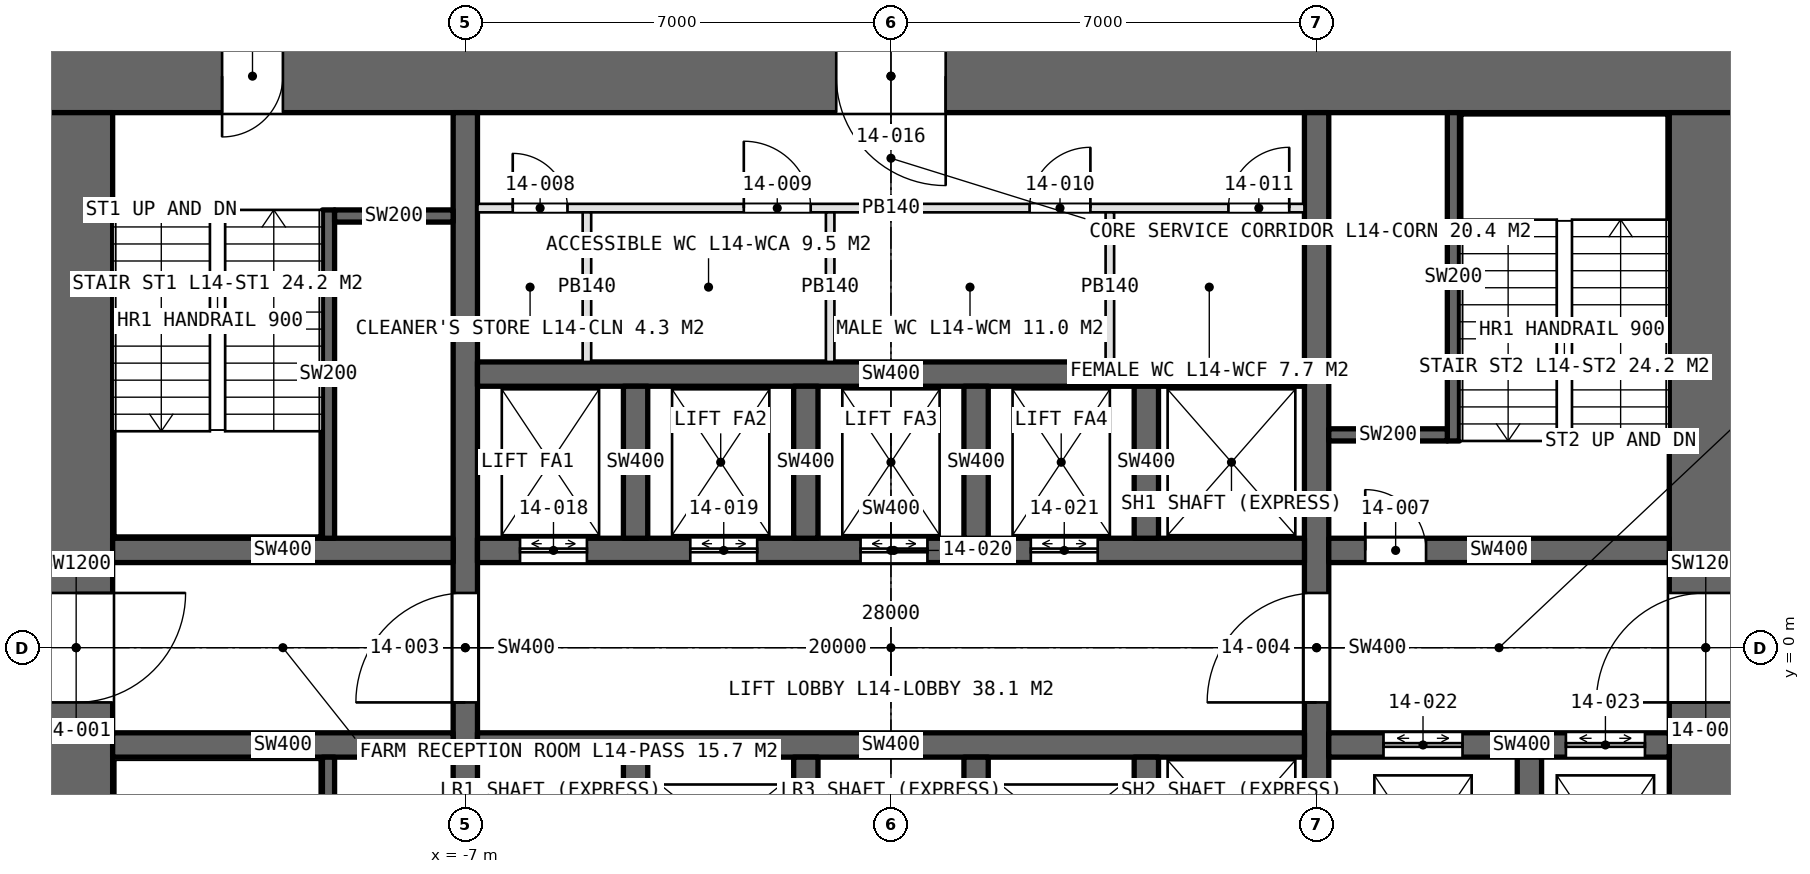
"""IFC4 building model, lengths in metres.
Left out: names, types, materials, properties, quantities, classifications, styles, units other than length and angle.
Written with IfcOpenShell. Run it as: python <this file> out.ifc"""

import sys

from ifc_helpers import new_model, si_unit, direction, frame, frame_2d, origin, place, context, subcontext, project, spatial, rectangle, extrude, element, fill, save


model = new_model("IFC4")
c1 = context("Model", 3, precision=1e-05, world=origin(), true_north=direction((0.0, 1.0)))
c2 = subcontext(c1, "Body", "Model", "MODEL_VIEW")
j1 = project(units=[si_unit("LENGTHUNIT", "METRE"), si_unit("PLANEANGLEUNIT", "RADIAN")], contexts=[c1])
p1 = place(None, origin())
s1 = spatial("IfcSite", under=j1, at=p1, CompositionType="ELEMENT")
p2 = place(p1, origin())
s2 = spatial("IfcBuilding", under=s1, at=p2, CompositionType="ELEMENT")
p3 = place(p2, frame((0.0, 0.0, 70.0)))
s3 = spatial("IfcBuildingStorey", under=s2, at=p3, CompositionType="ELEMENT", Elevation=70.0)
p4 = place(p3, frame((14.0, 9.4, 0.0), z_axis=(0.0, 0.0, 1.0), x_axis=(-1.0, 0.0, 0.0)))
e1 = element("IfcWall", 1, at=p4, inside=s3, PredefinedType="SHEAR", context=c2, shape_type="SweptSolid", body=[
    extrude(rectangle(XDim=28.0, YDim=1.2, at=frame_2d((14.0, 0.0))), origin(), (0.0, 0.0, 1.0), 5.0),
])
p5 = place(p4, frame((24.0, 0.0, 0.0)))
e2 = element("IfcOpeningElement", 2, at=p5, cuts=e1, PredefinedType="OPENING", context=c2, shape_type="SweptSolid", body=[
    extrude(rectangle(XDim=1.0, YDim=2.4, at=frame_2d((0.5, 1.2))), frame((0.0, 0.61, 0.0), z_axis=(0.0, -1.0, 0.0), x_axis=(1.0, 0.0, 0.0)), (0.0, 0.0, 1.0), 1.22),
])
p6 = place(p4, frame((13.1, 0.0, 0.0)))
e3 = element("IfcOpeningElement", 3, at=p6, cuts=e1, PredefinedType="OPENING", context=c2, shape_type="SweptSolid", body=[
    extrude(rectangle(XDim=1.8, YDim=2.4, at=frame_2d((0.9, 1.2))), frame((0.0, 0.61, 0.0), z_axis=(0.0, -1.0, 0.0), x_axis=(1.0, 0.0, 0.0)), (0.0, 0.0, 1.0), 1.22),
])
p7 = place(p3, frame((-13.4, 8.8, 0.0), z_axis=(0.0, 0.0, 1.0), x_axis=(0.0, -1.0, 0.0)))
e4 = element("IfcWall", 4, at=p7, inside=s3, PredefinedType="SHEAR", context=c2, shape_type="SweptSolid", body=[
    extrude(rectangle(XDim=17.6, YDim=1.2, at=frame_2d((8.8, 0.0))), origin(), (0.0, 0.0, 1.0), 5.0),
])
p8 = place(p7, frame((7.9, 0.0, 0.0)))
e5 = element("IfcOpeningElement", 5, at=p8, cuts=e4, PredefinedType="OPENING", context=c2, shape_type="SweptSolid", body=[
    extrude(rectangle(XDim=1.8, YDim=2.4, at=frame_2d((0.9, 1.2))), frame((0.0, 0.61, 0.0), z_axis=(0.0, -1.0, 0.0), x_axis=(1.0, 0.0, 0.0)), (0.0, 0.0, 1.0), 1.22),
])
p9 = place(p7, frame((16.5, 0.0, 0.0)))
e6 = element("IfcOpeningElement", 6, at=p9, cuts=e4, PredefinedType="OPENING", context=c2, shape_type="SweptSolid", body=[
    extrude(rectangle(XDim=1.0, YDim=2.4, at=frame_2d((0.5, 1.2))), frame((0.0, 0.61, 0.0), z_axis=(0.0, -1.0, 0.0), x_axis=(1.0, 0.0, 0.0)), (0.0, 0.0, 1.0), 1.22),
])
p10 = place(p3, frame((13.4, -8.8, 0.0), z_axis=(0.0, 0.0, 1.0), x_axis=(0.0, 1.0, 0.0)))
e7 = element("IfcWall", 7, at=p10, inside=s3, PredefinedType="SHEAR", context=c2, shape_type="SweptSolid", body=[
    extrude(rectangle(XDim=17.6, YDim=1.2, at=frame_2d((8.8, 0.0))), origin(), (0.0, 0.0, 1.0), 5.0),
])
p11 = place(p10, frame((7.9, 0.0, 0.0)))
e8 = element("IfcOpeningElement", 8, at=p11, cuts=e7, PredefinedType="OPENING", context=c2, shape_type="SweptSolid", body=[
    extrude(rectangle(XDim=1.8, YDim=2.4, at=frame_2d((0.9, 1.2))), frame((0.0, 0.61, 0.0), z_axis=(0.0, -1.0, 0.0), x_axis=(1.0, 0.0, 0.0)), (0.0, 0.0, 1.0), 1.22),
])
p12 = place(p3, frame((-7.0, -8.8, 0.0), z_axis=(0.0, 0.0, 1.0), x_axis=(0.0, 1.0, 0.0)))
e9 = element("IfcWall", 9, at=p12, inside=s3, PredefinedType="SHEAR", context=c2, shape_type="SweptSolid", body=[
    extrude(rectangle(XDim=17.6, YDim=0.4, at=frame_2d((8.8, 0.0))), origin(), (0.0, 0.0, 1.0), 5.0),
])
p13 = place(p12, frame((7.9, 0.0, 0.0)))
e10 = element("IfcOpeningElement", 10, at=p13, cuts=e9, PredefinedType="OPENING", context=c2, shape_type="SweptSolid", body=[
    extrude(rectangle(XDim=1.8, YDim=2.4, at=frame_2d((0.9, 1.2))), frame((0.0, 0.21, 0.0), z_axis=(0.0, -1.0, 0.0), x_axis=(1.0, 0.0, 0.0)), (0.0, 0.0, 1.0), 0.42),
])
p14 = place(p3, frame((7.0, -8.8, 0.0), z_axis=(0.0, 0.0, 1.0), x_axis=(0.0, 1.0, 0.0)))
e11 = element("IfcWall", 11, at=p14, inside=s3, PredefinedType="SHEAR", context=c2, shape_type="SweptSolid", body=[
    extrude(rectangle(XDim=17.6, YDim=0.4, at=frame_2d((8.8, 0.0))), origin(), (0.0, 0.0, 1.0), 5.0),
])
p15 = place(p14, frame((7.9, 0.0, 0.0)))
e12 = element("IfcOpeningElement", 12, at=p15, cuts=e11, PredefinedType="OPENING", context=c2, shape_type="SweptSolid", body=[
    extrude(rectangle(XDim=1.8, YDim=2.4, at=frame_2d((0.9, 1.2))), frame((0.0, 0.21, 0.0), z_axis=(0.0, -1.0, 0.0), x_axis=(1.0, 0.0, 0.0)), (0.0, 0.0, 1.0), 0.42),
])
p16 = place(p3, frame((-6.8, 1.6, 0.0), z_axis=(0.0, 0.0, 1.0), x_axis=(1.0, 0.0, 0.0)))
e13 = element("IfcWall", 13, at=p16, inside=s3, PredefinedType="SHEAR", context=c2, shape_type="SweptSolid", body=[
    extrude(rectangle(XDim=13.6, YDim=0.4, at=frame_2d((6.8, 0.0))), origin(), (0.0, 0.0, 1.0), 5.0),
])
p17 = place(p16, frame((0.7, 0.0, 0.0)))
e14 = element("IfcOpeningElement", 14, at=p17, cuts=e13, PredefinedType="OPENING", context=c2, shape_type="SweptSolid", body=[
    extrude(rectangle(XDim=1.1, YDim=2.4, at=frame_2d((0.55, 1.2))), frame((0.0, 0.21, 0.0), z_axis=(0.0, -1.0, 0.0), x_axis=(1.0, 0.0, 0.0)), (0.0, 0.0, 1.0), 0.42),
])
p18 = place(p16, frame((3.5, 0.0, 0.0)))
e15 = element("IfcOpeningElement", 15, at=p18, cuts=e13, PredefinedType="OPENING", context=c2, shape_type="SweptSolid", body=[
    extrude(rectangle(XDim=1.1, YDim=2.4, at=frame_2d((0.55, 1.2))), frame((0.0, 0.21, 0.0), z_axis=(0.0, -1.0, 0.0), x_axis=(1.0, 0.0, 0.0)), (0.0, 0.0, 1.0), 0.42),
])
p19 = place(p16, frame((6.3, 0.0, 0.0)))
e16 = element("IfcOpeningElement", 16, at=p19, cuts=e13, PredefinedType="OPENING", context=c2, shape_type="SweptSolid", body=[
    extrude(rectangle(XDim=1.1, YDim=2.4, at=frame_2d((0.55, 1.2))), frame((0.0, 0.21, 0.0), z_axis=(0.0, -1.0, 0.0), x_axis=(1.0, 0.0, 0.0)), (0.0, 0.0, 1.0), 0.42),
])
p20 = place(p16, frame((9.1, 0.0, 0.0)))
e17 = element("IfcOpeningElement", 17, at=p20, cuts=e13, PredefinedType="OPENING", context=c2, shape_type="SweptSolid", body=[
    extrude(rectangle(XDim=1.1, YDim=2.4, at=frame_2d((0.55, 1.2))), frame((0.0, 0.21, 0.0), z_axis=(0.0, -1.0, 0.0), x_axis=(1.0, 0.0, 0.0)), (0.0, 0.0, 1.0), 0.42),
])
for number, where, z_axis, x_axis in (
    (18, (-6.8, -1.6, 0.0), (0.0, 0.0, 1.0), (1.0, 0.0, 0.0)),
    (19, (-6.8, 4.5, 0.0), (0.0, 0.0, 1.0), (1.0, 0.0, 0.0)),
):
    element("IfcWall", number, at=place(p3, frame(where, z_axis=z_axis, x_axis=x_axis)), inside=s3, PredefinedType="SHEAR", context=c2, shape_type="SweptSolid", body=[
        extrude(rectangle(XDim=13.6, YDim=0.4, at=frame_2d((6.8, 0.0))), origin(), (0.0, 0.0, 1.0), 5.0),
    ])
for number, where, z_axis, x_axis in (
    (20, (-12.8, 1.6, 0.0), (0.0, 0.0, 1.0), (1.0, 0.0, 0.0)),
    (21, (-12.8, -1.6, 0.0), (0.0, 0.0, 1.0), (1.0, 0.0, 0.0)),
):
    element("IfcWall", number, at=place(p3, frame(where, z_axis=z_axis, x_axis=x_axis)), inside=s3, PredefinedType="SHEAR", context=c2, shape_type="SweptSolid", body=[
        extrude(rectangle(XDim=5.6, YDim=0.4, at=frame_2d((2.8, 0.0))), origin(), (0.0, 0.0, 1.0), 5.0),
    ])
p21 = place(p3, frame((7.2, 1.6, 0.0), z_axis=(0.0, 0.0, 1.0), x_axis=(1.0, 0.0, 0.0)))
e22 = element("IfcWall", 22, at=p21, inside=s3, PredefinedType="SHEAR", context=c2, shape_type="SweptSolid", body=[
    extrude(rectangle(XDim=5.6, YDim=0.4, at=frame_2d((2.8, 0.0))), origin(), (0.0, 0.0, 1.0), 5.0),
])
p22 = place(p21, frame((0.6, 0.0, 0.0)))
e23 = element("IfcOpeningElement", 23, at=p22, cuts=e22, PredefinedType="OPENING", context=c2, shape_type="SweptSolid", body=[
    extrude(rectangle(XDim=1.0, YDim=2.4, at=frame_2d((0.5, 1.2))), frame((0.0, 0.21, 0.0), z_axis=(0.0, -1.0, 0.0), x_axis=(1.0, 0.0, 0.0)), (0.0, 0.0, 1.0), 0.42),
])
p23 = place(p3, frame((7.2, -1.6, 0.0), z_axis=(0.0, 0.0, 1.0), x_axis=(1.0, 0.0, 0.0)))
e24 = element("IfcWall", 24, at=p23, inside=s3, PredefinedType="SHEAR", context=c2, shape_type="SweptSolid", body=[
    extrude(rectangle(XDim=5.6, YDim=0.4, at=frame_2d((2.8, 0.0))), origin(), (0.0, 0.0, 1.0), 5.0),
])
p24 = place(p23, frame((0.9, 0.0, 0.0)))
e25 = element("IfcOpeningElement", 25, at=p24, cuts=e24, PredefinedType="OPENING", context=c2, shape_type="SweptSolid", body=[
    extrude(rectangle(XDim=1.3, YDim=2.4, at=frame_2d((0.65, 1.2))), frame((0.0, 0.21, 0.0), z_axis=(0.0, -1.0, 0.0), x_axis=(1.0, 0.0, 0.0)), (0.0, 0.0, 1.0), 0.42),
])
p25 = place(p23, frame((3.9, 0.0, 0.0)))
e26 = element("IfcOpeningElement", 26, at=p25, cuts=e24, PredefinedType="OPENING", context=c2, shape_type="SweptSolid", body=[
    extrude(rectangle(XDim=1.3, YDim=2.4, at=frame_2d((0.65, 1.2))), frame((0.0, 0.21, 0.0), z_axis=(0.0, -1.0, 0.0), x_axis=(1.0, 0.0, 0.0)), (0.0, 0.0, 1.0), 0.42),
])
p26 = place(p3, frame((10.5, -4.8, 0.0), z_axis=(0.0, 0.0, 1.0), x_axis=(0.0, 1.0, 0.0)))
e27 = element("IfcWall", 27, at=p26, inside=s3, PredefinedType="SHEAR", context=c2, shape_type="SweptSolid", body=[
    extrude(rectangle(XDim=3.0, YDim=0.4, at=frame_2d((1.5, 0.0))), origin(), (0.0, 0.0, 1.0), 5.0),
])
for number, where, z_axis, x_axis in (
    (28, (-4.2, 1.8, 0.0), (0.0, 0.0, 1.0), (0.0, 1.0, 0.0)),
    (29, (-4.2, -4.3, 0.0), (0.0, 0.0, 1.0), (0.0, 1.0, 0.0)),
    (30, (-1.4, 1.8, 0.0), (0.0, 0.0, 1.0), (0.0, 1.0, 0.0)),
    (31, (-1.4, -4.3, 0.0), (0.0, 0.0, 1.0), (0.0, 1.0, 0.0)),
    (32, (1.4, 1.8, 0.0), (0.0, 0.0, 1.0), (0.0, 1.0, 0.0)),
    (33, (1.4, -4.3, 0.0), (0.0, 0.0, 1.0), (0.0, 1.0, 0.0)),
    (34, (4.2, 1.8, 0.0), (0.0, 0.0, 1.0), (0.0, 1.0, 0.0)),
    (35, (4.2, -4.3, 0.0), (0.0, 0.0, 1.0), (0.0, 1.0, 0.0)),
):
    element("IfcWall", number, at=place(p3, frame(where, z_axis=z_axis, x_axis=x_axis)), inside=s3, PredefinedType="SHEAR", context=c2, shape_type="SweptSolid", body=[
        extrude(rectangle(XDim=2.5, YDim=0.4, at=frame_2d((1.25, 0.0))), origin(), (0.0, 0.0, 1.0), 5.0),
    ])
p27 = place(p3, frame((-6.8, 7.23, 0.0), z_axis=(0.0, 0.0, 1.0), x_axis=(1.0, 0.0, 0.0)))
e36 = element("IfcWall", 36, at=p27, inside=s3, PredefinedType="PARTITIONING", context=c2, shape_type="SweptSolid", body=[
    extrude(rectangle(XDim=13.6, YDim=0.14, at=frame_2d((6.8, 0.0))), origin(), (0.0, 0.0, 1.0), 4.75),
])
p28 = place(p27, frame((0.58, 0.0, 0.0)))
e37 = element("IfcOpeningElement", 37, at=p28, cuts=e36, PredefinedType="OPENING", context=c2, shape_type="SweptSolid", body=[
    extrude(rectangle(XDim=0.9, YDim=2.4, at=frame_2d((0.45, 1.2))), frame((0.0, 0.08, 0.0), z_axis=(0.0, -1.0, 0.0), x_axis=(1.0, 0.0, 0.0)), (0.0, 0.0, 1.0), 0.16),
])
p29 = place(p27, frame((4.38, 0.0, 0.0)))
e38 = element("IfcOpeningElement", 38, at=p29, cuts=e36, PredefinedType="OPENING", context=c2, shape_type="SweptSolid", body=[
    extrude(rectangle(XDim=1.1, YDim=2.4, at=frame_2d((0.55, 1.2))), frame((0.0, 0.08, 0.0), z_axis=(0.0, -1.0, 0.0), x_axis=(1.0, 0.0, 0.0)), (0.0, 0.0, 1.0), 0.16),
])
p30 = place(p27, frame((9.08, 0.0, 0.0)))
e39 = element("IfcOpeningElement", 39, at=p30, cuts=e36, PredefinedType="OPENING", context=c2, shape_type="SweptSolid", body=[
    extrude(rectangle(XDim=1.0, YDim=2.4, at=frame_2d((0.5, 1.2))), frame((0.0, 0.08, 0.0), z_axis=(0.0, -1.0, 0.0), x_axis=(1.0, 0.0, 0.0)), (0.0, 0.0, 1.0), 0.16),
])
p31 = place(p27, frame((12.35, 0.0, 0.0)))
e40 = element("IfcOpeningElement", 40, at=p31, cuts=e36, PredefinedType="OPENING", context=c2, shape_type="SweptSolid", body=[
    extrude(rectangle(XDim=1.0, YDim=2.4, at=frame_2d((0.5, 1.2))), frame((0.0, 0.08, 0.0), z_axis=(0.0, -1.0, 0.0), x_axis=(1.0, 0.0, 0.0)), (0.0, 0.0, 1.0), 0.16),
])
for number, where, z_axis, x_axis in (
    (41, (-5.0, 4.7, 0.0), (0.0, 0.0, 1.0), (0.0, 1.0, 0.0)),
    (42, (-1.0, 4.7, 0.0), (0.0, 0.0, 1.0), (0.0, 1.0, 0.0)),
    (43, (3.6, 4.7, 0.0), (0.0, 0.0, 1.0), (0.0, 1.0, 0.0)),
):
    element("IfcWall", number, at=place(p3, frame(where, z_axis=z_axis, x_axis=x_axis)), inside=s3, PredefinedType="PARTITIONING", context=c2, shape_type="SweptSolid", body=[
        extrude(rectangle(XDim=2.46, YDim=0.14, at=frame_2d((1.23, 0.0))), origin(), (0.0, 0.0, 1.0), 4.75),
    ])
p32 = place(p3, frame((-9.25, 7.2, 0.0), z_axis=(0.0, 0.0, 1.0), x_axis=(0.0, -1.0, 0.0)))
e44 = element("IfcWall", 44, at=p32, inside=s3, PredefinedType="SOLIDWALL", context=c2, shape_type="SweptSolid", body=[
    extrude(rectangle(XDim=5.4, YDim=0.2, at=frame_2d((2.7, 0.0))), origin(), (0.0, 0.0, 1.0), 5.0),
])
p33 = place(p3, frame((-9.15, 7.1, 0.0), z_axis=(0.0, 0.0, 1.0), x_axis=(1.0, 0.0, 0.0)))
e45 = element("IfcWall", 45, at=p33, inside=s3, PredefinedType="SOLIDWALL", context=c2, shape_type="SweptSolid", body=[
    extrude(rectangle(XDim=1.95, YDim=0.2, at=frame_2d((0.975, 0.0))), origin(), (0.0, 0.0, 1.0), 5.0),
])
p34 = place(p3, frame((-9.25, -7.2, 0.0), z_axis=(0.0, 0.0, 1.0), x_axis=(0.0, 1.0, 0.0)))
e46 = element("IfcWall", 46, at=p34, inside=s3, PredefinedType="SOLIDWALL", context=c2, shape_type="SweptSolid", body=[
    extrude(rectangle(XDim=5.4, YDim=0.2, at=frame_2d((2.7, 0.0))), origin(), (0.0, 0.0, 1.0), 5.0),
])
p35 = place(p3, frame((9.25, 3.4, 0.0), z_axis=(0.0, 0.0, 1.0), x_axis=(0.0, 1.0, 0.0)))
e47 = element("IfcWall", 47, at=p35, inside=s3, PredefinedType="SOLIDWALL", context=c2, shape_type="SweptSolid", body=[
    extrude(rectangle(XDim=5.4, YDim=0.2, at=frame_2d((2.7, 0.0))), origin(), (0.0, 0.0, 1.0), 5.0),
])
p36 = place(p3, frame((9.15, 3.5, 0.0), z_axis=(0.0, 0.0, 1.0), x_axis=(-1.0, 0.0, 0.0)))
e48 = element("IfcWall", 48, at=p36, inside=s3, PredefinedType="SOLIDWALL", context=c2, shape_type="SweptSolid", body=[
    extrude(rectangle(XDim=1.95, YDim=0.2, at=frame_2d((0.975, 0.0))), origin(), (0.0, 0.0, 1.0), 5.0),
])
p37 = place(p8, origin())
e49 = element("IfcDoor", 49, at=p37, inside=s3, OperationType="DOUBLE_DOOR_SINGLE_SWING", PredefinedType="DOOR", context=c2, shape_type="SweptSolid", body=[
    extrude(rectangle(XDim=1.8, YDim=2.4, at=frame_2d((0.9, 1.2))), frame((0.0, 0.025, 0.0), z_axis=(0.0, -1.0, 0.0), x_axis=(1.0, 0.0, 0.0)), (0.0, 0.0, 1.0), 0.05),
])
fill(e5, e49)
p38 = place(p11, origin())
e50 = element("IfcDoor", 50, at=p38, inside=s3, OperationType="DOUBLE_DOOR_SINGLE_SWING", PredefinedType="DOOR", context=c2, shape_type="SweptSolid", body=[
    extrude(rectangle(XDim=1.8, YDim=2.4, at=frame_2d((0.9, 1.2))), frame((0.0, 0.025, 0.0), z_axis=(0.0, -1.0, 0.0), x_axis=(1.0, 0.0, 0.0)), (0.0, 0.0, 1.0), 0.05),
])
fill(e8, e50)
p39 = place(p13, origin())
e51 = element("IfcDoor", 51, at=p39, inside=s3, OperationType="DOUBLE_DOOR_SINGLE_SWING", PredefinedType="DOOR", context=c2, shape_type="SweptSolid", body=[
    extrude(rectangle(XDim=1.8, YDim=2.4, at=frame_2d((0.9, 1.2))), frame((0.0, 0.025, 0.0), z_axis=(0.0, -1.0, 0.0), x_axis=(1.0, 0.0, 0.0)), (0.0, 0.0, 1.0), 0.05),
])
fill(e10, e51)
p40 = place(p15, origin())
e52 = element("IfcDoor", 52, at=p40, inside=s3, OperationType="DOUBLE_DOOR_SINGLE_SWING", PredefinedType="DOOR", context=c2, shape_type="SweptSolid", body=[
    extrude(rectangle(XDim=1.8, YDim=2.4, at=frame_2d((0.9, 1.2))), frame((0.0, 0.025, 0.0), z_axis=(0.0, -1.0, 0.0), x_axis=(1.0, 0.0, 0.0)), (0.0, 0.0, 1.0), 0.05),
])
fill(e12, e52)
p41 = place(p5, origin())
e53 = element("IfcDoor", 53, at=p41, inside=s3, OperationType="SINGLE_SWING_RIGHT", PredefinedType="DOOR", context=c2, shape_type="SweptSolid", body=[
    extrude(rectangle(XDim=1.0, YDim=2.4, at=frame_2d((0.5, 1.2))), frame((0.0, 0.025, 0.0), z_axis=(0.0, -1.0, 0.0), x_axis=(1.0, 0.0, 0.0)), (0.0, 0.0, 1.0), 0.05),
])
fill(e2, e53)
p42 = place(p22, origin())
e54 = element("IfcDoor", 54, at=p42, inside=s3, OperationType="SINGLE_SWING_LEFT", PredefinedType="DOOR", context=c2, shape_type="SweptSolid", body=[
    extrude(rectangle(XDim=1.0, YDim=2.4, at=frame_2d((0.5, 1.2))), frame((0.0, 0.025, 0.0), z_axis=(0.0, -1.0, 0.0), x_axis=(1.0, 0.0, 0.0)), (0.0, 0.0, 1.0), 0.05),
])
fill(e23, e54)
p43 = place(p28, origin())
e55 = element("IfcDoor", 55, at=p43, inside=s3, OperationType="SINGLE_SWING_LEFT", PredefinedType="DOOR", context=c2, shape_type="SweptSolid", body=[
    extrude(rectangle(XDim=0.9, YDim=2.4, at=frame_2d((0.45, 1.2))), frame((0.0, 0.025, 0.0), z_axis=(0.0, -1.0, 0.0), x_axis=(1.0, 0.0, 0.0)), (0.0, 0.0, 1.0), 0.05),
])
fill(e37, e55)
p44 = place(p29, origin())
e56 = element("IfcDoor", 56, at=p44, inside=s3, OperationType="SINGLE_SWING_LEFT", PredefinedType="DOOR", context=c2, shape_type="SweptSolid", body=[
    extrude(rectangle(XDim=1.1, YDim=2.4, at=frame_2d((0.55, 1.2))), frame((0.0, 0.025, 0.0), z_axis=(0.0, -1.0, 0.0), x_axis=(1.0, 0.0, 0.0)), (0.0, 0.0, 1.0), 0.05),
])
fill(e38, e56)
p45 = place(p30, origin())
e57 = element("IfcDoor", 57, at=p45, inside=s3, OperationType="SINGLE_SWING_RIGHT", PredefinedType="DOOR", context=c2, shape_type="SweptSolid", body=[
    extrude(rectangle(XDim=1.0, YDim=2.4, at=frame_2d((0.5, 1.2))), frame((0.0, 0.025, 0.0), z_axis=(0.0, -1.0, 0.0), x_axis=(1.0, 0.0, 0.0)), (0.0, 0.0, 1.0), 0.05),
])
fill(e39, e57)
p46 = place(p31, origin())
e58 = element("IfcDoor", 58, at=p46, inside=s3, OperationType="SINGLE_SWING_RIGHT", PredefinedType="DOOR", context=c2, shape_type="SweptSolid", body=[
    extrude(rectangle(XDim=1.0, YDim=2.4, at=frame_2d((0.5, 1.2))), frame((0.0, 0.025, 0.0), z_axis=(0.0, -1.0, 0.0), x_axis=(1.0, 0.0, 0.0)), (0.0, 0.0, 1.0), 0.05),
])
fill(e40, e58)
p47 = place(p6, origin())
e59 = element("IfcDoor", 59, at=p47, inside=s3, OperationType="DOUBLE_DOOR_SINGLE_SWING", PredefinedType="DOOR", context=c2, shape_type="SweptSolid", body=[
    extrude(rectangle(XDim=1.8, YDim=2.4, at=frame_2d((0.9, 1.2))), frame((0.0, 0.025, 0.0), z_axis=(0.0, -1.0, 0.0), x_axis=(1.0, 0.0, 0.0)), (0.0, 0.0, 1.0), 0.05),
])
fill(e3, e59)
p48 = place(p17, origin())
e60 = element("IfcDoor", 60, at=p48, inside=s3, OperationType="DOUBLE_DOOR_SLIDING", PredefinedType="DOOR", context=c2, shape_type="SweptSolid", body=[
    extrude(rectangle(XDim=1.1, YDim=2.4, at=frame_2d((0.55, 1.2))), frame((0.0, 0.025, 0.0), z_axis=(0.0, -1.0, 0.0), x_axis=(1.0, 0.0, 0.0)), (0.0, 0.0, 1.0), 0.05),
])
fill(e14, e60)
p49 = place(p18, origin())
e61 = element("IfcDoor", 61, at=p49, inside=s3, OperationType="DOUBLE_DOOR_SLIDING", PredefinedType="DOOR", context=c2, shape_type="SweptSolid", body=[
    extrude(rectangle(XDim=1.1, YDim=2.4, at=frame_2d((0.55, 1.2))), frame((0.0, 0.025, 0.0), z_axis=(0.0, -1.0, 0.0), x_axis=(1.0, 0.0, 0.0)), (0.0, 0.0, 1.0), 0.05),
])
fill(e15, e61)
p50 = place(p19, origin())
e62 = element("IfcDoor", 62, at=p50, inside=s3, OperationType="DOUBLE_DOOR_SLIDING", PredefinedType="DOOR", context=c2, shape_type="SweptSolid", body=[
    extrude(rectangle(XDim=1.1, YDim=2.4, at=frame_2d((0.55, 1.2))), frame((0.0, 0.025, 0.0), z_axis=(0.0, -1.0, 0.0), x_axis=(1.0, 0.0, 0.0)), (0.0, 0.0, 1.0), 0.05),
])
fill(e16, e62)
p51 = place(p20, origin())
e63 = element("IfcDoor", 63, at=p51, inside=s3, OperationType="DOUBLE_DOOR_SLIDING", PredefinedType="DOOR", context=c2, shape_type="SweptSolid", body=[
    extrude(rectangle(XDim=1.1, YDim=2.4, at=frame_2d((0.55, 1.2))), frame((0.0, 0.025, 0.0), z_axis=(0.0, -1.0, 0.0), x_axis=(1.0, 0.0, 0.0)), (0.0, 0.0, 1.0), 0.05),
])
fill(e17, e63)
p52 = place(p24, origin())
e64 = element("IfcDoor", 64, at=p52, inside=s3, OperationType="DOUBLE_DOOR_SLIDING", PredefinedType="DOOR", context=c2, shape_type="SweptSolid", body=[
    extrude(rectangle(XDim=1.3, YDim=2.4, at=frame_2d((0.65, 1.2))), frame((0.0, 0.025, 0.0), z_axis=(0.0, -1.0, 0.0), x_axis=(1.0, 0.0, 0.0)), (0.0, 0.0, 1.0), 0.05),
])
fill(e25, e64)
p53 = place(p25, origin())
e65 = element("IfcDoor", 65, at=p53, inside=s3, OperationType="DOUBLE_DOOR_SLIDING", PredefinedType="DOOR", context=c2, shape_type="SweptSolid", body=[
    extrude(rectangle(XDim=1.3, YDim=2.4, at=frame_2d((0.65, 1.2))), frame((0.0, 0.025, 0.0), z_axis=(0.0, -1.0, 0.0), x_axis=(1.0, 0.0, 0.0)), (0.0, 0.0, 1.0), 0.05),
])
fill(e26, e65)
save(model, sys.argv[1])
